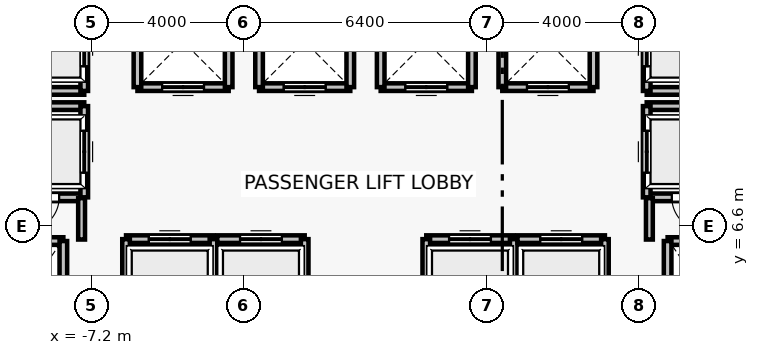
"""IFC4 building model, lengths in metres.
Left out: names, types, materials, properties, quantities, classifications, styles, units other than length and angle.
Written with IfcOpenShell. Run it as: python <this file> out.ifc"""

import sys

from ifc_helpers import new_model, si_unit, direction, frame, frame_2d, origin, place, context, subcontext, project, spatial, rectangle, extrude, source, transform, mapped, element, fill, save


model = new_model("IFC4")
c1 = context("Model", 3, precision=1e-05, world=origin(), true_north=direction((0.0, 1.0)))
c2 = subcontext(c1, "Body", "Model", "MODEL_VIEW")
j1 = project(units=[si_unit("LENGTHUNIT", "METRE"), si_unit("PLANEANGLEUNIT", "RADIAN")], contexts=[c1])
p1 = place(None, origin())
s1 = spatial("IfcSite", under=j1, at=p1, CompositionType="ELEMENT")
p2 = place(p1, origin())
s2 = spatial("IfcBuilding", under=s1, at=p2, CompositionType="ELEMENT")
p3 = place(p2, origin())
s3 = spatial("IfcBuildingStorey", under=s2, at=p3, CompositionType="ELEMENT", Elevation=0.0)
p4 = place(p3, frame((-9.95, 6.2, 0.0), z_axis=(0.0, 0.0, 1.0), x_axis=(1.0, 0.0, 0.0)))
e1 = element("IfcWall", 1, at=p4, inside=s3, PredefinedType="SOLIDWALL", context=c2, shape_type="SweptSolid", body=[
    extrude(rectangle(XDim=2.0, YDim=0.2, at=frame_2d((1.0, 0.0))), origin(), (0.0, 0.0, 1.0), 4.7),
])
p5 = place(p3, frame((-7.95, 6.2, 0.0), z_axis=(0.0, 0.0, 1.0), x_axis=(0.0, -1.0, 0.0)))
e2 = element("IfcWall", 2, at=p5, inside=s3, PredefinedType="SOLIDWALL", context=c2, shape_type="SweptSolid", body=[
    extrude(rectangle(XDim=2.8, YDim=0.2, at=frame_2d((1.4, 0.0))), origin(), (0.0, 0.0, 1.0), 4.7),
])
p6 = place(p3, frame((7.95, 6.2, 0.0), z_axis=(0.0, 0.0, 1.0), x_axis=(1.0, 0.0, 0.0)))
e3 = element("IfcWall", 3, at=p6, inside=s3, PredefinedType="SOLIDWALL", context=c2, shape_type="SweptSolid", body=[
    extrude(rectangle(XDim=2.0, YDim=0.2, at=frame_2d((1.0, 0.0))), origin(), (0.0, 0.0, 1.0), 4.7),
])
p7 = place(p3, frame((7.95, 3.4, 0.0), z_axis=(0.0, 0.0, 1.0), x_axis=(0.0, 1.0, 0.0)))
e4 = element("IfcWall", 4, at=p7, inside=s3, PredefinedType="SOLIDWALL", context=c2, shape_type="SweptSolid", body=[
    extrude(rectangle(XDim=2.8, YDim=0.2, at=frame_2d((1.4, 0.0))), origin(), (0.0, 0.0, 1.0), 4.7),
])
p8 = place(p3, frame((-3.6, 10.25, 0.0), z_axis=(0.0, 0.0, 1.0), x_axis=(-1.0, 0.0, 0.0)))
e5 = element("IfcWall", 5, at=p8, inside=s3, PredefinedType="SOLIDWALL", context=c2, shape_type="SweptSolid", body=[
    extrude(rectangle(XDim=2.4, YDim=0.2, at=frame_2d((1.2, 0.0))), origin(), (0.0, 0.0, 1.0), 4.7),
])
p9 = place(p8, frame((0.65, 0.0, 0.0)))
e6 = element("IfcOpeningElement", 6, at=p9, cuts=e5, PredefinedType="OPENING", context=c2, shape_type="SweptSolid", body=[
    extrude(rectangle(XDim=1.1, YDim=2.2, at=frame_2d((0.55, 1.1))), frame((0.0, 0.11, 0.0), z_axis=(0.0, -1.0, 0.0), x_axis=(1.0, 0.0, 0.0)), (0.0, 0.0, 1.0), 0.22),
])
for number, where, z_axis, x_axis in (
    (7, (-6.0, 10.25, 0.0), (0.0, 0.0, 1.0), (0.0, 1.0, 0.0)),
    (8, (-3.6, 12.65, 0.0), (0.0, 0.0, 1.0), (0.0, -1.0, 0.0)),
):
    element("IfcWall", number, at=place(p3, frame(where, z_axis=z_axis, x_axis=x_axis)), inside=s3, PredefinedType="SOLIDWALL", context=c2, shape_type="SweptSolid", body=[
        extrude(rectangle(XDim=2.4, YDim=0.2, at=frame_2d((1.2, 0.0))), origin(), (0.0, 0.0, 1.0), 4.7),
    ])
p10 = place(p3, frame((-0.4, 10.25, 0.0), z_axis=(0.0, 0.0, 1.0), x_axis=(-1.0, 0.0, 0.0)))
e9 = element("IfcWall", 9, at=p10, inside=s3, PredefinedType="SOLIDWALL", context=c2, shape_type="SweptSolid", body=[
    extrude(rectangle(XDim=2.4, YDim=0.2, at=frame_2d((1.2, 0.0))), origin(), (0.0, 0.0, 1.0), 4.7),
])
p11 = place(p10, frame((0.65, 0.0, 0.0)))
e10 = element("IfcOpeningElement", 10, at=p11, cuts=e9, PredefinedType="OPENING", context=c2, shape_type="SweptSolid", body=[
    extrude(rectangle(XDim=1.1, YDim=2.2, at=frame_2d((0.55, 1.1))), frame((0.0, 0.11, 0.0), z_axis=(0.0, -1.0, 0.0), x_axis=(1.0, 0.0, 0.0)), (0.0, 0.0, 1.0), 0.22),
])
for number, where, z_axis, x_axis in (
    (11, (-2.8, 10.25, 0.0), (0.0, 0.0, 1.0), (0.0, 1.0, 0.0)),
    (12, (-0.4, 12.65, 0.0), (0.0, 0.0, 1.0), (0.0, -1.0, 0.0)),
):
    element("IfcWall", number, at=place(p3, frame(where, z_axis=z_axis, x_axis=x_axis)), inside=s3, PredefinedType="SOLIDWALL", context=c2, shape_type="SweptSolid", body=[
        extrude(rectangle(XDim=2.4, YDim=0.2, at=frame_2d((1.2, 0.0))), origin(), (0.0, 0.0, 1.0), 4.7),
    ])
p12 = place(p3, frame((2.8, 10.25, 0.0), z_axis=(0.0, 0.0, 1.0), x_axis=(-1.0, 0.0, 0.0)))
e13 = element("IfcWall", 13, at=p12, inside=s3, PredefinedType="SOLIDWALL", context=c2, shape_type="SweptSolid", body=[
    extrude(rectangle(XDim=2.4, YDim=0.2, at=frame_2d((1.2, 0.0))), origin(), (0.0, 0.0, 1.0), 4.7),
])
p13 = place(p12, frame((0.65, 0.0, 0.0)))
e14 = element("IfcOpeningElement", 14, at=p13, cuts=e13, PredefinedType="OPENING", context=c2, shape_type="SweptSolid", body=[
    extrude(rectangle(XDim=1.1, YDim=2.2, at=frame_2d((0.55, 1.1))), frame((0.0, 0.11, 0.0), z_axis=(0.0, -1.0, 0.0), x_axis=(1.0, 0.0, 0.0)), (0.0, 0.0, 1.0), 0.22),
])
for number, where, z_axis, x_axis in (
    (15, (0.4, 10.25, 0.0), (0.0, 0.0, 1.0), (0.0, 1.0, 0.0)),
    (16, (2.8, 12.65, 0.0), (0.0, 0.0, 1.0), (0.0, -1.0, 0.0)),
):
    element("IfcWall", number, at=place(p3, frame(where, z_axis=z_axis, x_axis=x_axis)), inside=s3, PredefinedType="SOLIDWALL", context=c2, shape_type="SweptSolid", body=[
        extrude(rectangle(XDim=2.4, YDim=0.2, at=frame_2d((1.2, 0.0))), origin(), (0.0, 0.0, 1.0), 4.7),
    ])
p14 = place(p3, frame((6.0, 10.25, 0.0), z_axis=(0.0, 0.0, 1.0), x_axis=(-1.0, 0.0, 0.0)))
e17 = element("IfcWall", 17, at=p14, inside=s3, PredefinedType="SOLIDWALL", context=c2, shape_type="SweptSolid", body=[
    extrude(rectangle(XDim=2.4, YDim=0.2, at=frame_2d((1.2, 0.0))), origin(), (0.0, 0.0, 1.0), 4.7),
])
p15 = place(p14, frame((0.65, 0.0, 0.0)))
e18 = element("IfcOpeningElement", 18, at=p15, cuts=e17, PredefinedType="OPENING", context=c2, shape_type="SweptSolid", body=[
    extrude(rectangle(XDim=1.1, YDim=2.2, at=frame_2d((0.55, 1.1))), frame((0.0, 0.11, 0.0), z_axis=(0.0, -1.0, 0.0), x_axis=(1.0, 0.0, 0.0)), (0.0, 0.0, 1.0), 0.22),
])
for number, where, z_axis, x_axis in (
    (19, (3.6, 10.25, 0.0), (0.0, 0.0, 1.0), (0.0, 1.0, 0.0)),
    (20, (6.0, 12.65, 0.0), (0.0, 0.0, 1.0), (0.0, -1.0, 0.0)),
):
    element("IfcWall", number, at=place(p3, frame(where, z_axis=z_axis, x_axis=x_axis)), inside=s3, PredefinedType="SOLIDWALL", context=c2, shape_type="SweptSolid", body=[
        extrude(rectangle(XDim=2.4, YDim=0.2, at=frame_2d((1.2, 0.0))), origin(), (0.0, 0.0, 1.0), 4.7),
    ])
p16 = place(p3, frame((-6.3, 6.25, 0.0), z_axis=(0.0, 0.0, 1.0), x_axis=(1.0, 0.0, 0.0)))
e21 = element("IfcWall", 21, at=p16, inside=s3, PredefinedType="SOLIDWALL", context=c2, shape_type="SweptSolid", body=[
    extrude(rectangle(XDim=2.3, YDim=0.2, at=frame_2d((1.15, 0.0))), origin(), (0.0, 0.0, 1.0), 4.7),
])
p17 = place(p16, frame((0.6, 0.0, 0.0)))
e22 = element("IfcOpeningElement", 22, at=p17, cuts=e21, PredefinedType="OPENING", context=c2, shape_type="SweptSolid", body=[
    extrude(rectangle(XDim=1.1, YDim=2.2, at=frame_2d((0.55, 1.1))), frame((0.0, 0.11, 0.0), z_axis=(0.0, -1.0, 0.0), x_axis=(1.0, 0.0, 0.0)), (0.0, 0.0, 1.0), 0.22),
])
for number, where, z_axis, x_axis in (
    (23, (-6.3, 3.85, 0.0), (0.0, 0.0, 1.0), (0.0, 1.0, 0.0)),
    (24, (-4.0, 6.25, 0.0), (0.0, 0.0, 1.0), (0.0, -1.0, 0.0)),
):
    element("IfcWall", number, at=place(p3, frame(where, z_axis=z_axis, x_axis=x_axis)), inside=s3, PredefinedType="SOLIDWALL", context=c2, shape_type="SweptSolid", body=[
        extrude(rectangle(XDim=2.4, YDim=0.2, at=frame_2d((1.2, 0.0))), origin(), (0.0, 0.0, 1.0), 4.7),
    ])
p18 = place(p3, frame((-3.9, 6.25, 0.0), z_axis=(0.0, 0.0, 1.0), x_axis=(1.0, 0.0, 0.0)))
e25 = element("IfcWall", 25, at=p18, inside=s3, PredefinedType="SOLIDWALL", context=c2, shape_type="SweptSolid", body=[
    extrude(rectangle(XDim=2.3, YDim=0.2, at=frame_2d((1.15, 0.0))), origin(), (0.0, 0.0, 1.0), 4.7),
])
p19 = place(p18, frame((0.6, 0.0, 0.0)))
e26 = element("IfcOpeningElement", 26, at=p19, cuts=e25, PredefinedType="OPENING", context=c2, shape_type="SweptSolid", body=[
    extrude(rectangle(XDim=1.1, YDim=2.2, at=frame_2d((0.55, 1.1))), frame((0.0, 0.11, 0.0), z_axis=(0.0, -1.0, 0.0), x_axis=(1.0, 0.0, 0.0)), (0.0, 0.0, 1.0), 0.22),
])
p20 = place(p3, frame((-1.6, 6.25, 0.0), z_axis=(0.0, 0.0, 1.0), x_axis=(0.0, -1.0, 0.0)))
e27 = element("IfcWall", 27, at=p20, inside=s3, PredefinedType="SOLIDWALL", context=c2, shape_type="SweptSolid", body=[
    extrude(rectangle(XDim=2.4, YDim=0.2, at=frame_2d((1.2, 0.0))), origin(), (0.0, 0.0, 1.0), 4.7),
])
p21 = place(p3, frame((1.6, 6.25, 0.0), z_axis=(0.0, 0.0, 1.0), x_axis=(1.0, 0.0, 0.0)))
e28 = element("IfcWall", 28, at=p21, inside=s3, PredefinedType="SOLIDWALL", context=c2, shape_type="SweptSolid", body=[
    extrude(rectangle(XDim=2.3, YDim=0.2, at=frame_2d((1.15, 0.0))), origin(), (0.0, 0.0, 1.0), 4.7),
])
p22 = place(p21, frame((0.6, 0.0, 0.0)))
e29 = element("IfcOpeningElement", 29, at=p22, cuts=e28, PredefinedType="OPENING", context=c2, shape_type="SweptSolid", body=[
    extrude(rectangle(XDim=1.1, YDim=2.2, at=frame_2d((0.55, 1.1))), frame((0.0, 0.11, 0.0), z_axis=(0.0, -1.0, 0.0), x_axis=(1.0, 0.0, 0.0)), (0.0, 0.0, 1.0), 0.22),
])
for number, where, z_axis, x_axis in (
    (30, (1.6, 3.85, 0.0), (0.0, 0.0, 1.0), (0.0, 1.0, 0.0)),
    (31, (3.9, 6.25, 0.0), (0.0, 0.0, 1.0), (0.0, -1.0, 0.0)),
):
    element("IfcWall", number, at=place(p3, frame(where, z_axis=z_axis, x_axis=x_axis)), inside=s3, PredefinedType="SOLIDWALL", context=c2, shape_type="SweptSolid", body=[
        extrude(rectangle(XDim=2.4, YDim=0.2, at=frame_2d((1.2, 0.0))), origin(), (0.0, 0.0, 1.0), 4.7),
    ])
p23 = place(p3, frame((4.0, 6.25, 0.0), z_axis=(0.0, 0.0, 1.0), x_axis=(1.0, 0.0, 0.0)))
e32 = element("IfcWall", 32, at=p23, inside=s3, PredefinedType="SOLIDWALL", context=c2, shape_type="SweptSolid", body=[
    extrude(rectangle(XDim=2.3, YDim=0.2, at=frame_2d((1.15, 0.0))), origin(), (0.0, 0.0, 1.0), 4.7),
])
p24 = place(p23, frame((0.6, 0.0, 0.0)))
e33 = element("IfcOpeningElement", 33, at=p24, cuts=e32, PredefinedType="OPENING", context=c2, shape_type="SweptSolid", body=[
    extrude(rectangle(XDim=1.1, YDim=2.2, at=frame_2d((0.55, 1.1))), frame((0.0, 0.11, 0.0), z_axis=(0.0, -1.0, 0.0), x_axis=(1.0, 0.0, 0.0)), (0.0, 0.0, 1.0), 0.22),
])
p25 = place(p3, frame((6.3, 6.25, 0.0), z_axis=(0.0, 0.0, 1.0), x_axis=(0.0, -1.0, 0.0)))
e34 = element("IfcWall", 34, at=p25, inside=s3, PredefinedType="SOLIDWALL", context=c2, shape_type="SweptSolid", body=[
    extrude(rectangle(XDim=2.4, YDim=0.2, at=frame_2d((1.2, 0.0))), origin(), (0.0, 0.0, 1.0), 4.7),
])
p26 = place(p3, frame((-7.4, 7.35, 0.0), z_axis=(0.0, 0.0, 1.0), x_axis=(-1.0, 0.0, 0.0)))
e35 = element("IfcWall", 35, at=p26, inside=s3, PredefinedType="SOLIDWALL", context=c2, shape_type="SweptSolid", body=[
    extrude(rectangle(XDim=2.2, YDim=0.2, at=frame_2d((1.1, 0.0))), origin(), (0.0, 0.0, 1.0), 3.79),
])
p27 = place(p26, frame((0.66, 0.0, 0.0)))
e36 = element("IfcOpeningElement", 36, at=p27, cuts=e35, PredefinedType="OPENING", context=c2, shape_type="SweptSolid", body=[
    extrude(rectangle(XDim=0.88, YDim=2.1, at=frame_2d((0.44, 1.05))), frame((0.0, 0.11, 0.0), z_axis=(0.0, -1.0, 0.0), x_axis=(1.0, 0.0, 0.0)), (0.0, 0.0, 1.0), 0.22),
])
p28 = place(p3, frame((-9.6, 9.75, 0.0), z_axis=(0.0, 0.0, 1.0), x_axis=(1.0, 0.0, 0.0)))
e37 = element("IfcWall", 37, at=p28, inside=s3, PredefinedType="SOLIDWALL", context=c2, shape_type="SweptSolid", body=[
    extrude(rectangle(XDim=2.2, YDim=0.2, at=frame_2d((1.1, 0.0))), origin(), (0.0, 0.0, 1.0), 3.79),
])
p29 = place(p3, frame((-7.4, 9.75, 0.0), z_axis=(0.0, 0.0, 1.0), x_axis=(0.0, -1.0, 0.0)))
e38 = element("IfcWall", 38, at=p29, inside=s3, PredefinedType="SOLIDWALL", context=c2, shape_type="SweptSolid", body=[
    extrude(rectangle(XDim=2.4, YDim=0.2, at=frame_2d((1.2, 0.0))), origin(), (0.0, 0.0, 1.0), 3.79),
])
p30 = place(p29, frame((0.65, 0.0, 0.0)))
e39 = element("IfcOpeningElement", 39, at=p30, cuts=e38, PredefinedType="OPENING", context=c2, shape_type="SweptSolid", body=[
    extrude(rectangle(XDim=1.1, YDim=2.2, at=frame_2d((0.55, 1.1))), frame((0.0, 0.11, 0.0), z_axis=(0.0, -1.0, 0.0), x_axis=(1.0, 0.0, 0.0)), (0.0, 0.0, 1.0), 0.22),
])
p31 = place(p3, frame((-7.4, 10.15, 0.0), z_axis=(0.0, 0.0, 1.0), x_axis=(-1.0, 0.0, 0.0)))
e40 = element("IfcWall", 40, at=p31, inside=s3, PredefinedType="SOLIDWALL", context=c2, shape_type="SweptSolid", body=[
    extrude(rectangle(XDim=2.2, YDim=0.2, at=frame_2d((1.1, 0.0))), origin(), (0.0, 0.0, 1.0), 3.79),
])
p32 = place(p3, frame((-7.4, 12.55, 0.0), z_axis=(0.0, 0.0, 1.0), x_axis=(0.0, -1.0, 0.0)))
e41 = element("IfcWall", 41, at=p32, inside=s3, PredefinedType="SOLIDWALL", context=c2, shape_type="SweptSolid", body=[
    extrude(rectangle(XDim=2.4, YDim=0.2, at=frame_2d((1.2, 0.0))), origin(), (0.0, 0.0, 1.0), 3.79),
])
p33 = place(p32, frame((0.65, 0.0, 0.0)))
e42 = element("IfcOpeningElement", 42, at=p33, cuts=e41, PredefinedType="OPENING", context=c2, shape_type="SweptSolid", body=[
    extrude(rectangle(XDim=1.1, YDim=2.2, at=frame_2d((0.55, 1.1))), frame((0.0, 0.11, 0.0), z_axis=(0.0, -1.0, 0.0), x_axis=(1.0, 0.0, 0.0)), (0.0, 0.0, 1.0), 0.22),
])
p34 = place(p3, frame((9.6, 7.35, 0.0), z_axis=(0.0, 0.0, 1.0), x_axis=(-1.0, 0.0, 0.0)))
e43 = element("IfcWall", 43, at=p34, inside=s3, PredefinedType="SOLIDWALL", context=c2, shape_type="SweptSolid", body=[
    extrude(rectangle(XDim=2.2, YDim=0.2, at=frame_2d((1.1, 0.0))), origin(), (0.0, 0.0, 1.0), 3.79),
])
p35 = place(p34, frame((0.66, 0.0, 0.0)))
e44 = element("IfcOpeningElement", 44, at=p35, cuts=e43, PredefinedType="OPENING", context=c2, shape_type="SweptSolid", body=[
    extrude(rectangle(XDim=0.88, YDim=2.1, at=frame_2d((0.44, 1.05))), frame((0.0, 0.11, 0.0), z_axis=(0.0, -1.0, 0.0), x_axis=(1.0, 0.0, 0.0)), (0.0, 0.0, 1.0), 0.22),
])
p36 = place(p3, frame((7.4, 9.75, 0.0), z_axis=(0.0, 0.0, 1.0), x_axis=(1.0, 0.0, 0.0)))
e45 = element("IfcWall", 45, at=p36, inside=s3, PredefinedType="SOLIDWALL", context=c2, shape_type="SweptSolid", body=[
    extrude(rectangle(XDim=2.2, YDim=0.2, at=frame_2d((1.1, 0.0))), origin(), (0.0, 0.0, 1.0), 3.79),
])
p37 = place(p3, frame((7.4, 7.35, 0.0), z_axis=(0.0, 0.0, 1.0), x_axis=(0.0, 1.0, 0.0)))
e46 = element("IfcWall", 46, at=p37, inside=s3, PredefinedType="SOLIDWALL", context=c2, shape_type="SweptSolid", body=[
    extrude(rectangle(XDim=2.4, YDim=0.2, at=frame_2d((1.2, 0.0))), origin(), (0.0, 0.0, 1.0), 3.79),
])
p38 = place(p37, frame((0.65, 0.0, 0.0)))
e47 = element("IfcOpeningElement", 47, at=p38, cuts=e46, PredefinedType="OPENING", context=c2, shape_type="SweptSolid", body=[
    extrude(rectangle(XDim=1.1, YDim=2.2, at=frame_2d((0.55, 1.1))), frame((0.0, 0.11, 0.0), z_axis=(0.0, -1.0, 0.0), x_axis=(1.0, 0.0, 0.0)), (0.0, 0.0, 1.0), 0.22),
])
p39 = place(p3, frame((9.6, 10.15, 0.0), z_axis=(0.0, 0.0, 1.0), x_axis=(-1.0, 0.0, 0.0)))
e48 = element("IfcWall", 48, at=p39, inside=s3, PredefinedType="SOLIDWALL", context=c2, shape_type="SweptSolid", body=[
    extrude(rectangle(XDim=2.2, YDim=0.2, at=frame_2d((1.1, 0.0))), origin(), (0.0, 0.0, 1.0), 3.79),
])
p40 = place(p3, frame((7.4, 10.15, 0.0), z_axis=(0.0, 0.0, 1.0), x_axis=(0.0, 1.0, 0.0)))
e49 = element("IfcWall", 49, at=p40, inside=s3, PredefinedType="SOLIDWALL", context=c2, shape_type="SweptSolid", body=[
    extrude(rectangle(XDim=2.4, YDim=0.2, at=frame_2d((1.2, 0.0))), origin(), (0.0, 0.0, 1.0), 3.79),
])
p41 = place(p40, frame((0.65, 0.0, 0.0)))
e50 = element("IfcOpeningElement", 50, at=p41, cuts=e49, PredefinedType="OPENING", context=c2, shape_type="SweptSolid", body=[
    extrude(rectangle(XDim=1.1, YDim=2.2, at=frame_2d((0.55, 1.1))), frame((0.0, 0.11, 0.0), z_axis=(0.0, -1.0, 0.0), x_axis=(1.0, 0.0, 0.0)), (0.0, 0.0, 1.0), 0.22),
])
for number, where, z_axis, x_axis in (
    (51, (-7.47, 7.33, 0.0), (0.0, 0.0, 1.0), (0.0, -1.0, 0.0)),
    (52, (7.47, 6.24, 0.0), (0.0, 0.0, 1.0), (0.0, 1.0, 0.0)),
):
    element("IfcWall", number, at=place(p3, frame(where, z_axis=z_axis, x_axis=x_axis)), inside=s3, PredefinedType="PARTITIONING", context=c2, shape_type="SweptSolid", body=[
        extrude(rectangle(XDim=1.09, YDim=0.18, at=frame_2d((0.545, 0.0))), origin(), (0.0, 0.0, 1.0), 3.79),
    ])
m1 = source(origin(), c2, "Body", "SweptSolid", [
    extrude(rectangle(XDim=1.1, YDim=2.2, at=frame_2d((0.55, 1.1))), frame((0.0, 0.025, 0.0), z_axis=(0.0, -1.0, 0.0), x_axis=(1.0, 0.0, 0.0)), (0.0, 0.0, 1.0), 0.05),
])
p42 = place(p9, origin())
e53 = element("IfcDoor", 53, at=p42, inside=s3, OperationType="DOUBLE_DOOR_SLIDING", PredefinedType="DOOR", context=c2, shape_type="MappedRepresentation", body=[
    mapped(m1, transform((0.0, 0.0, 0.0), x_axis=(1.0, 0.0, 0.0), y_axis=(0.0, 1.0, 0.0), z_axis=(0.0, 0.0, 1.0), scale=1.0)),
])
fill(e6, e53)
p43 = place(p11, origin())
e54 = element("IfcDoor", 54, at=p43, inside=s3, OperationType="DOUBLE_DOOR_SLIDING", PredefinedType="DOOR", context=c2, shape_type="MappedRepresentation", body=[
    mapped(m1, transform((0.0, 0.0, 0.0), x_axis=(1.0, 0.0, 0.0), y_axis=(0.0, 1.0, 0.0), z_axis=(0.0, 0.0, 1.0), scale=1.0)),
])
fill(e10, e54)
p44 = place(p13, origin())
e55 = element("IfcDoor", 55, at=p44, inside=s3, OperationType="DOUBLE_DOOR_SLIDING", PredefinedType="DOOR", context=c2, shape_type="MappedRepresentation", body=[
    mapped(m1, transform((0.0, 0.0, 0.0), x_axis=(1.0, 0.0, 0.0), y_axis=(0.0, 1.0, 0.0), z_axis=(0.0, 0.0, 1.0), scale=1.0)),
])
fill(e14, e55)
p45 = place(p15, origin())
e56 = element("IfcDoor", 56, at=p45, inside=s3, OperationType="DOUBLE_DOOR_SLIDING", PredefinedType="DOOR", context=c2, shape_type="MappedRepresentation", body=[
    mapped(m1, transform((0.0, 0.0, 0.0), x_axis=(1.0, 0.0, 0.0), y_axis=(0.0, 1.0, 0.0), z_axis=(0.0, 0.0, 1.0), scale=1.0)),
])
fill(e18, e56)
p46 = place(p17, origin())
e57 = element("IfcDoor", 57, at=p46, inside=s3, OperationType="DOUBLE_DOOR_SLIDING", PredefinedType="DOOR", context=c2, shape_type="MappedRepresentation", body=[
    mapped(m1, transform((0.0, 0.0, 0.0), x_axis=(1.0, 0.0, 0.0), y_axis=(0.0, 1.0, 0.0), z_axis=(0.0, 0.0, 1.0), scale=1.0)),
])
fill(e22, e57)
p47 = place(p19, origin())
e58 = element("IfcDoor", 58, at=p47, inside=s3, OperationType="DOUBLE_DOOR_SLIDING", PredefinedType="DOOR", context=c2, shape_type="MappedRepresentation", body=[
    mapped(m1, transform((0.0, 0.0, 0.0), x_axis=(1.0, 0.0, 0.0), y_axis=(0.0, 1.0, 0.0), z_axis=(0.0, 0.0, 1.0), scale=1.0)),
])
fill(e26, e58)
p48 = place(p22, origin())
e59 = element("IfcDoor", 59, at=p48, inside=s3, OperationType="DOUBLE_DOOR_SLIDING", PredefinedType="DOOR", context=c2, shape_type="MappedRepresentation", body=[
    mapped(m1, transform((0.0, 0.0, 0.0), x_axis=(1.0, 0.0, 0.0), y_axis=(0.0, 1.0, 0.0), z_axis=(0.0, 0.0, 1.0), scale=1.0)),
])
fill(e29, e59)
p49 = place(p24, origin())
e60 = element("IfcDoor", 60, at=p49, inside=s3, OperationType="DOUBLE_DOOR_SLIDING", PredefinedType="DOOR", context=c2, shape_type="MappedRepresentation", body=[
    mapped(m1, transform((0.0, 0.0, 0.0), x_axis=(1.0, 0.0, 0.0), y_axis=(0.0, 1.0, 0.0), z_axis=(0.0, 0.0, 1.0), scale=1.0)),
])
fill(e33, e60)
p50 = place(p30, origin())
e61 = element("IfcDoor", 61, at=p50, inside=s3, OperationType="DOUBLE_DOOR_SLIDING", PredefinedType="DOOR", context=c2, shape_type="MappedRepresentation", body=[
    mapped(m1, transform((0.0, 0.0, 0.0), x_axis=(1.0, 0.0, 0.0), y_axis=(0.0, 1.0, 0.0), z_axis=(0.0, 0.0, 1.0), scale=1.0)),
])
fill(e39, e61)
p51 = place(p33, origin())
e62 = element("IfcDoor", 62, at=p51, inside=s3, OperationType="DOUBLE_DOOR_SLIDING", PredefinedType="DOOR", context=c2, shape_type="MappedRepresentation", body=[
    mapped(m1, transform((0.0, 0.0, 0.0), x_axis=(1.0, 0.0, 0.0), y_axis=(0.0, 1.0, 0.0), z_axis=(0.0, 0.0, 1.0), scale=1.0)),
])
fill(e42, e62)
p52 = place(p38, origin())
e63 = element("IfcDoor", 63, at=p52, inside=s3, OperationType="DOUBLE_DOOR_SLIDING", PredefinedType="DOOR", context=c2, shape_type="MappedRepresentation", body=[
    mapped(m1, transform((0.0, 0.0, 0.0), x_axis=(1.0, 0.0, 0.0), y_axis=(0.0, 1.0, 0.0), z_axis=(0.0, 0.0, 1.0), scale=1.0)),
])
fill(e47, e63)
p53 = place(p41, origin())
e64 = element("IfcDoor", 64, at=p53, inside=s3, OperationType="DOUBLE_DOOR_SLIDING", PredefinedType="DOOR", context=c2, shape_type="MappedRepresentation", body=[
    mapped(m1, transform((0.0, 0.0, 0.0), x_axis=(1.0, 0.0, 0.0), y_axis=(0.0, 1.0, 0.0), z_axis=(0.0, 0.0, 1.0), scale=1.0)),
])
fill(e50, e64)
m2 = source(origin(), c2, "Body", "SweptSolid", [
    extrude(rectangle(XDim=0.88, YDim=2.1, at=frame_2d((0.44, 1.05))), frame((0.0, 0.025, 0.0), z_axis=(0.0, -1.0, 0.0), x_axis=(1.0, 0.0, 0.0)), (0.0, 0.0, 1.0), 0.05),
])
p54 = place(p27, origin())
e65 = element("IfcDoor", 65, at=p54, inside=s3, OperationType="SINGLE_SWING_RIGHT", PredefinedType="DOOR", context=c2, shape_type="MappedRepresentation", body=[
    mapped(m2, transform((0.0, 0.0, 0.0), x_axis=(1.0, 0.0, 0.0), y_axis=(0.0, 1.0, 0.0), z_axis=(0.0, 0.0, 1.0), scale=1.0)),
])
fill(e36, e65)
p55 = place(p35, origin())
e66 = element("IfcDoor", 66, at=p55, inside=s3, OperationType="SINGLE_SWING_LEFT", PredefinedType="DOOR", context=c2, shape_type="MappedRepresentation", body=[
    mapped(m2, transform((0.0, 0.0, 0.0), x_axis=(1.0, 0.0, 0.0), y_axis=(0.0, 1.0, 0.0), z_axis=(0.0, 0.0, 1.0), scale=1.0)),
])
fill(e44, e66)
save(model, sys.argv[1])
